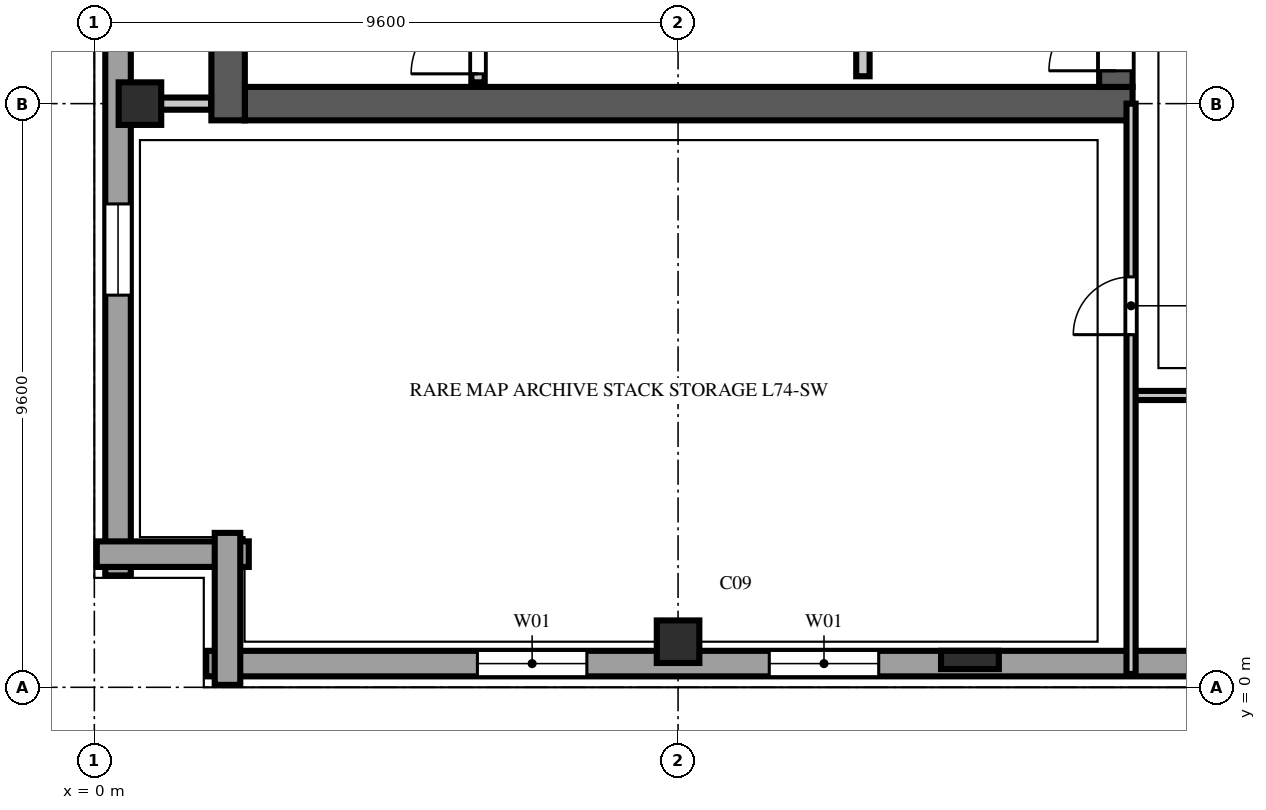
"""IFC4 building model, lengths in metres.
Left out: names, types, materials, properties, quantities, classifications, styles, units other than length and angle.
Written with IfcOpenShell. Run it as: python <this file> out.ifc"""

import sys

from ifc_helpers import new_model, si_unit, direction, frame, frame_2d, origin, origin_2d, place, context, subcontext, project, spatial, rectangle, extrude, element, fill, save


model = new_model("IFC4")
c1 = context("Model", 3, precision=1e-05, world=origin(), true_north=direction((0.0, 1.0)))
c2 = subcontext(c1, "Body", "Model", "MODEL_VIEW")
j1 = project(units=[si_unit("LENGTHUNIT", "METRE"), si_unit("PLANEANGLEUNIT", "RADIAN")], contexts=[c1])
p1 = place(None, origin())
s1 = spatial("IfcSite", under=j1, at=p1, CompositionType="ELEMENT")
p2 = place(p1, origin())
s2 = spatial("IfcBuilding", under=s1, at=p2, CompositionType="ELEMENT")
p3 = place(p2, frame((0.0, 0.0, 292.4)))
s3 = spatial("IfcBuildingStorey", under=s2, at=p3, CompositionType="ELEMENT", Elevation=292.4)
p4 = place(p3, frame((2.475, 9.6, 0.0), z_axis=(0.0, 0.0, 1.0), x_axis=(1.0, 0.0, 0.0)))
e1 = element("IfcWall", 1, at=p4, inside=s3, PredefinedType="SHEAR", context=c2, shape_type="SweptSolid", body=[
    extrude(rectangle(XDim=14.6, YDim=0.55, at=frame_2d((7.3, 0.0))), origin(), (0.0, 0.0, 1.0), 3.54),
])
p5 = place(p3, frame((2.2, 9.325, 0.0), z_axis=(0.0, 0.0, 1.0), x_axis=(0.0, 1.0, 0.0)))
e2 = element("IfcWall", 2, at=p5, inside=s3, PredefinedType="SHEAR", context=c2, shape_type="SweptSolid", body=[
    extrude(rectangle(XDim=38.95, YDim=0.55, at=frame_2d((19.475, 0.0))), origin(), (0.0, 0.0, 1.0), 3.54),
])
p6 = place(p3, frame((16.8, 9.875, 0.0), z_axis=(0.0, 0.0, 1.0), x_axis=(0.0, 1.0, 0.0)))
e3 = element("IfcWall", 3, at=p6, inside=s3, PredefinedType="SHEAR", context=c2, shape_type="SweptSolid", body=[
    extrude(rectangle(XDim=12.525, YDim=0.55, at=frame_2d((6.262, 0.0))), origin(), (0.0, 0.0, 1.0), 3.54),
])
p7 = place(p6, frame((0.265, 0.0, 0.0)))
e4 = element("IfcOpeningElement", 4, at=p7, cuts=e3, PredefinedType="OPENING", context=c2, shape_type="SweptSolid", body=[
    extrude(rectangle(XDim=1.1, YDim=2.2, at=frame_2d((0.55, 1.1))), frame((0.0, 0.287, 0.0), z_axis=(0.0, -1.0, 0.0), x_axis=(1.0, 0.0, 0.0)), (0.0, 0.0, 1.0), 0.574),
])
for number, where, z_axis, x_axis in (
    (5, (0.75, 9.6, 0.0), (0.0, 0.0, 1.0), (1.0, 0.0, 0.0)),
    (6, (9.6, 0.75, 0.0), (0.0, 0.0, 1.0), (1.0, 0.0, 0.0)),
):
    element("IfcColumn", number, at=place(p3, frame(where, z_axis=z_axis, x_axis=x_axis)), inside=s3, PredefinedType="COLUMN", context=c2, shape_type="SweptSolid", body=[
        extrude(rectangle(XDim=0.7, YDim=0.7, at=origin_2d()), origin(), (0.0, 0.0, 1.0), 3.8),
    ])
p8 = place(p3, frame((14.4, 0.45, 0.0), z_axis=(0.0, 0.0, 1.0), x_axis=(1.0, 0.0, 0.0)))
e7 = element("IfcColumn", 7, at=p8, inside=s3, PredefinedType="PILASTER", context=c2, shape_type="SweptSolid", body=[
    extrude(rectangle(XDim=0.95, YDim=0.3, at=origin_2d()), origin(), (0.0, 0.0, 1.0), 3.8),
])
p9 = place(p3, frame((1.84, 0.39, 0.0), z_axis=(0.0, 0.0, 1.0), x_axis=(1.0, 0.0, 0.0)))
e8 = element("IfcWall", 8, at=p9, inside=s3, PredefinedType="SOLIDWALL", context=c2, shape_type="SweptSolid", body=[
    extrude(rectangle(XDim=44.32, YDim=0.42, at=frame_2d((22.16, 0.0))), origin(), (0.0, 0.0, 1.0), 3.54),
])
p10 = place(p9, frame((4.46, 0.0, 0.85)))
e9 = element("IfcOpeningElement", 9, at=p10, cuts=e8, PredefinedType="OPENING", context=c2, shape_type="SweptSolid", body=[
    extrude(rectangle(XDim=1.8, YDim=1.85, at=frame_2d((0.9, 0.925))), frame((0.0, 0.222, 0.0), z_axis=(0.0, -1.0, 0.0), x_axis=(1.0, 0.0, 0.0)), (0.0, 0.0, 1.0), 0.444),
])
p11 = place(p9, frame((9.26, 0.0, 0.85)))
e10 = element("IfcOpeningElement", 10, at=p11, cuts=e8, PredefinedType="OPENING", context=c2, shape_type="SweptSolid", body=[
    extrude(rectangle(XDim=1.8, YDim=1.85, at=frame_2d((0.9, 0.925))), frame((0.0, 0.222, 0.0), z_axis=(0.0, -1.0, 0.0), x_axis=(1.0, 0.0, 0.0)), (0.0, 0.0, 1.0), 0.444),
])
p12 = place(p9, frame((18.86, 0.0, 0.85)))
e11 = element("IfcOpeningElement", 11, at=p12, cuts=e8, PredefinedType="OPENING", context=c2, shape_type="SweptSolid", body=[
    extrude(rectangle(XDim=1.8, YDim=1.85, at=frame_2d((0.9, 0.925))), frame((0.0, 0.222, 0.0), z_axis=(0.0, -1.0, 0.0), x_axis=(1.0, 0.0, 0.0)), (0.0, 0.0, 1.0), 0.444),
])
p13 = place(p9, frame((28.46, 0.0, 0.85)))
e12 = element("IfcOpeningElement", 12, at=p13, cuts=e8, PredefinedType="OPENING", context=c2, shape_type="SweptSolid", body=[
    extrude(rectangle(XDim=1.8, YDim=1.85, at=frame_2d((0.9, 0.925))), frame((0.0, 0.222, 0.0), z_axis=(0.0, -1.0, 0.0), x_axis=(1.0, 0.0, 0.0)), (0.0, 0.0, 1.0), 0.444),
])
p14 = place(p9, frame((33.26, 0.0, 0.85)))
e13 = element("IfcOpeningElement", 13, at=p14, cuts=e8, PredefinedType="OPENING", context=c2, shape_type="SweptSolid", body=[
    extrude(rectangle(XDim=1.8, YDim=1.85, at=frame_2d((0.9, 0.925))), frame((0.0, 0.222, 0.0), z_axis=(0.0, -1.0, 0.0), x_axis=(1.0, 0.0, 0.0)), (0.0, 0.0, 1.0), 0.444),
])
p15 = place(p9, frame((38.06, 0.0, 0.85)))
e14 = element("IfcOpeningElement", 14, at=p15, cuts=e8, PredefinedType="OPENING", context=c2, shape_type="SweptSolid", body=[
    extrude(rectangle(XDim=1.8, YDim=1.85, at=frame_2d((0.9, 0.925))), frame((0.0, 0.222, 0.0), z_axis=(0.0, -1.0, 0.0), x_axis=(1.0, 0.0, 0.0)), (0.0, 0.0, 1.0), 0.444),
])
p16 = place(p3, frame((0.39, 46.16, 0.0), z_axis=(0.0, 0.0, 1.0), x_axis=(0.0, -1.0, 0.0)))
e15 = element("IfcWall", 15, at=p16, inside=s3, PredefinedType="SOLIDWALL", context=c2, shape_type="SweptSolid", body=[
    extrude(rectangle(XDim=44.32, YDim=0.42, at=frame_2d((22.16, 0.0))), origin(), (0.0, 0.0, 1.0), 3.54),
])
p17 = place(p16, frame((4.885, 0.0, 0.9)))
e16 = element("IfcOpeningElement", 16, at=p17, cuts=e15, PredefinedType="OPENING", context=c2, shape_type="SweptSolid", body=[
    extrude(rectangle(XDim=0.95, YDim=1.85, at=frame_2d((0.475, 0.925))), frame((0.0, 0.222, 0.0), z_axis=(0.0, -1.0, 0.0), x_axis=(1.0, 0.0, 0.0)), (0.0, 0.0, 1.0), 0.444),
])
p18 = place(p16, frame((9.41, 0.0, 0.9)))
e17 = element("IfcOpeningElement", 17, at=p18, cuts=e15, PredefinedType="OPENING", context=c2, shape_type="SweptSolid", body=[
    extrude(rectangle(XDim=1.5, YDim=1.85, at=frame_2d((0.75, 0.925))), frame((0.0, 0.222, 0.0), z_axis=(0.0, -1.0, 0.0), x_axis=(1.0, 0.0, 0.0)), (0.0, 0.0, 1.0), 0.444),
])
p19 = place(p16, frame((14.485, 0.0, 0.9)))
e18 = element("IfcOpeningElement", 18, at=p19, cuts=e15, PredefinedType="OPENING", context=c2, shape_type="SweptSolid", body=[
    extrude(rectangle(XDim=0.95, YDim=1.85, at=frame_2d((0.475, 0.925))), frame((0.0, 0.222, 0.0), z_axis=(0.0, -1.0, 0.0), x_axis=(1.0, 0.0, 0.0)), (0.0, 0.0, 1.0), 0.444),
])
p20 = place(p16, frame((19.01, 0.0, 0.9)))
e19 = element("IfcOpeningElement", 19, at=p20, cuts=e15, PredefinedType="OPENING", context=c2, shape_type="SweptSolid", body=[
    extrude(rectangle(XDim=1.5, YDim=1.85, at=frame_2d((0.75, 0.925))), frame((0.0, 0.222, 0.0), z_axis=(0.0, -1.0, 0.0), x_axis=(1.0, 0.0, 0.0)), (0.0, 0.0, 1.0), 0.444),
])
p21 = place(p16, frame((24.085, 0.0, 0.9)))
e20 = element("IfcOpeningElement", 20, at=p21, cuts=e15, PredefinedType="OPENING", context=c2, shape_type="SweptSolid", body=[
    extrude(rectangle(XDim=0.95, YDim=1.85, at=frame_2d((0.475, 0.925))), frame((0.0, 0.222, 0.0), z_axis=(0.0, -1.0, 0.0), x_axis=(1.0, 0.0, 0.0)), (0.0, 0.0, 1.0), 0.444),
])
p22 = place(p16, frame((28.61, 0.0, 0.9)))
e21 = element("IfcOpeningElement", 21, at=p22, cuts=e15, PredefinedType="OPENING", context=c2, shape_type="SweptSolid", body=[
    extrude(rectangle(XDim=1.5, YDim=1.85, at=frame_2d((0.75, 0.925))), frame((0.0, 0.222, 0.0), z_axis=(0.0, -1.0, 0.0), x_axis=(1.0, 0.0, 0.0)), (0.0, 0.0, 1.0), 0.444),
])
p23 = place(p16, frame((33.685, 0.0, 0.9)))
e22 = element("IfcOpeningElement", 22, at=p23, cuts=e15, PredefinedType="OPENING", context=c2, shape_type="SweptSolid", body=[
    extrude(rectangle(XDim=0.95, YDim=1.85, at=frame_2d((0.475, 0.925))), frame((0.0, 0.222, 0.0), z_axis=(0.0, -1.0, 0.0), x_axis=(1.0, 0.0, 0.0)), (0.0, 0.0, 1.0), 0.444),
])
p24 = place(p16, frame((38.21, 0.0, 0.9)))
e23 = element("IfcOpeningElement", 23, at=p24, cuts=e15, PredefinedType="OPENING", context=c2, shape_type="SweptSolid", body=[
    extrude(rectangle(XDim=1.5, YDim=1.85, at=frame_2d((0.75, 0.925))), frame((0.0, 0.222, 0.0), z_axis=(0.0, -1.0, 0.0), x_axis=(1.0, 0.0, 0.0)), (0.0, 0.0, 1.0), 0.444),
])
for number, where, z_axis, x_axis in (
    (24, (0.04, 2.19, 0.0), (0.0, 0.0, 1.0), (1.0, 0.0, 0.0)),
    (25, (2.19, 2.54, 0.0), (0.0, 0.0, 1.0), (0.0, -1.0, 0.0)),
):
    element("IfcWall", number, at=place(p3, frame(where, z_axis=z_axis, x_axis=x_axis)), inside=s3, PredefinedType="SOLIDWALL", context=c2, shape_type="SweptSolid", body=[
        extrude(rectangle(XDim=2.5, YDim=0.42, at=frame_2d((1.25, 0.0))), origin(), (0.0, 0.0, 1.0), 3.54),
    ])
p25 = place(p3, frame((6.31, 9.95, 0.0), z_axis=(0.0, 0.0, 1.0), x_axis=(0.0, 1.0, 0.0)))
e26 = element("IfcWall", 26, at=p25, inside=s3, PredefinedType="SOLIDWALL", context=c2, shape_type="SweptSolid", body=[
    extrude(rectangle(XDim=7.81, YDim=0.22, at=frame_2d((3.905, 0.0))), origin(), (0.0, 0.0, 1.0), 3.54),
])
p26 = place(p25, frame((0.14, 0.0, 0.0)))
e27 = element("IfcOpeningElement", 27, at=p26, cuts=e26, PredefinedType="OPENING", context=c2, shape_type="SweptSolid", body=[
    extrude(rectangle(XDim=1.1, YDim=2.2, at=frame_2d((0.55, 1.1))), frame((0.0, 0.122, 0.0), z_axis=(0.0, -1.0, 0.0), x_axis=(1.0, 0.0, 0.0)), (0.0, 0.0, 1.0), 0.244),
])
p27 = place(p3, frame((12.64, 10.05, 0.0), z_axis=(0.0, 0.0, 1.0), x_axis=(0.0, 1.0, 0.0)))
e28 = element("IfcWall", 28, at=p27, inside=s3, PredefinedType="SOLIDWALL", context=c2, shape_type="SweptSolid", body=[
    extrude(rectangle(XDim=7.71, YDim=0.22, at=frame_2d((3.855, 0.0))), origin(), (0.0, 0.0, 1.0), 3.54),
])
p28 = place(p3, frame((0.85, 9.6, 0.0), z_axis=(0.0, 0.0, 1.0), x_axis=(1.0, 0.0, 0.0)))
e29 = element("IfcWall", 29, at=p28, inside=s3, PredefinedType="SOLIDWALL", context=c2, shape_type="SweptSolid", body=[
    extrude(rectangle(XDim=1.07, YDim=0.2, at=frame_2d((0.535, 0.0))), origin(), (0.0, 0.0, 1.0), 3.184),
])
p29 = place(p3, frame((17.05, 4.8, 0.0), z_axis=(0.0, 0.0, 1.0), x_axis=(1.0, 0.0, 0.0)))
e30 = element("IfcWall", 30, at=p29, inside=s3, PredefinedType="PARTITIONING", context=c2, shape_type="SweptSolid", body=[
    extrude(rectangle(XDim=2.15, YDim=0.15, at=frame_2d((1.075, 0.0))), origin(), (0.0, 0.0, 1.0), 3.54),
])
p30 = place(p3, frame((17.05, 0.22, 0.0), z_axis=(0.0, 0.0, 1.0), x_axis=(0.0, 1.0, 0.0)))
e31 = element("IfcWall", 31, at=p30, inside=s3, PredefinedType="PARTITIONING", context=c2, shape_type="SweptSolid", body=[
    extrude(rectangle(XDim=9.38, YDim=0.15, at=frame_2d((4.69, 0.0))), origin(), (0.0, 0.0, 1.0), 3.54),
])
p31 = place(p30, frame((5.58, 0.0, 0.0)))
e32 = element("IfcOpeningElement", 32, at=p31, cuts=e31, PredefinedType="OPENING", context=c2, shape_type="SweptSolid", body=[
    extrude(rectangle(XDim=0.95, YDim=2.15, at=frame_2d((0.475, 1.075))), frame((0.0, 0.087, 0.0), z_axis=(0.0, -1.0, 0.0), x_axis=(1.0, 0.0, 0.0)), (0.0, 0.0, 1.0), 0.174),
])
p32 = place(p10, origin())
e33 = element("IfcWindow", 33, at=p32, inside=s3, PartitioningType="DOUBLE_PANEL_VERTICAL", PredefinedType="WINDOW", context=c2, shape_type="SweptSolid", body=[
    extrude(rectangle(XDim=1.8, YDim=1.85, at=frame_2d((0.9, 0.925))), frame((0.0, 0.11, 0.0), z_axis=(0.0, -1.0, 0.0), x_axis=(1.0, 0.0, 0.0)), (0.0, 0.0, 1.0), 0.06),
])
fill(e9, e33)
p33 = place(p11, origin())
e34 = element("IfcWindow", 34, at=p33, inside=s3, PartitioningType="DOUBLE_PANEL_VERTICAL", PredefinedType="WINDOW", context=c2, shape_type="SweptSolid", body=[
    extrude(rectangle(XDim=1.8, YDim=1.85, at=frame_2d((0.9, 0.925))), frame((0.0, 0.11, 0.0), z_axis=(0.0, -1.0, 0.0), x_axis=(1.0, 0.0, 0.0)), (0.0, 0.0, 1.0), 0.06),
])
fill(e10, e34)
p34 = place(p24, origin())
e35 = element("IfcWindow", 35, at=p34, inside=s3, PartitioningType="DOUBLE_PANEL_VERTICAL", PredefinedType="WINDOW", context=c2, shape_type="SweptSolid", body=[
    extrude(rectangle(XDim=1.5, YDim=1.85, at=frame_2d((0.75, 0.925))), frame((0.0, 0.11, 0.0), z_axis=(0.0, -1.0, 0.0), x_axis=(1.0, 0.0, 0.0)), (0.0, 0.0, 1.0), 0.06),
])
fill(e23, e35)
p35 = place(p26, origin())
e36 = element("IfcDoor", 36, at=p35, inside=s3, OperationType="SINGLE_SWING_LEFT", PredefinedType="DOOR", context=c2, shape_type="SweptSolid", body=[
    extrude(rectangle(XDim=1.1, YDim=2.2, at=frame_2d((0.55, 1.1))), frame((0.0, 0.025, 0.0), z_axis=(0.0, -1.0, 0.0), x_axis=(1.0, 0.0, 0.0)), (0.0, 0.0, 1.0), 0.05),
])
fill(e27, e36)
p36 = place(p7, origin())
e37 = element("IfcDoor", 37, at=p36, inside=s3, OperationType="SINGLE_SWING_LEFT", PredefinedType="DOOR", context=c2, shape_type="SweptSolid", body=[
    extrude(rectangle(XDim=1.1, YDim=2.2, at=frame_2d((0.55, 1.1))), frame((0.0, 0.025, 0.0), z_axis=(0.0, -1.0, 0.0), x_axis=(1.0, 0.0, 0.0)), (0.0, 0.0, 1.0), 0.05),
])
fill(e4, e37)
p37 = place(p31, origin())
e38 = element("IfcDoor", 38, at=p37, inside=s3, OperationType="SINGLE_SWING_LEFT", PredefinedType="DOOR", context=c2, shape_type="SweptSolid", body=[
    extrude(rectangle(XDim=0.95, YDim=2.15, at=frame_2d((0.475, 1.075))), frame((0.0, 0.025, 0.0), z_axis=(0.0, -1.0, 0.0), x_axis=(1.0, 0.0, 0.0)), (0.0, 0.0, 1.0), 0.05),
])
fill(e32, e38)
save(model, sys.argv[1])
